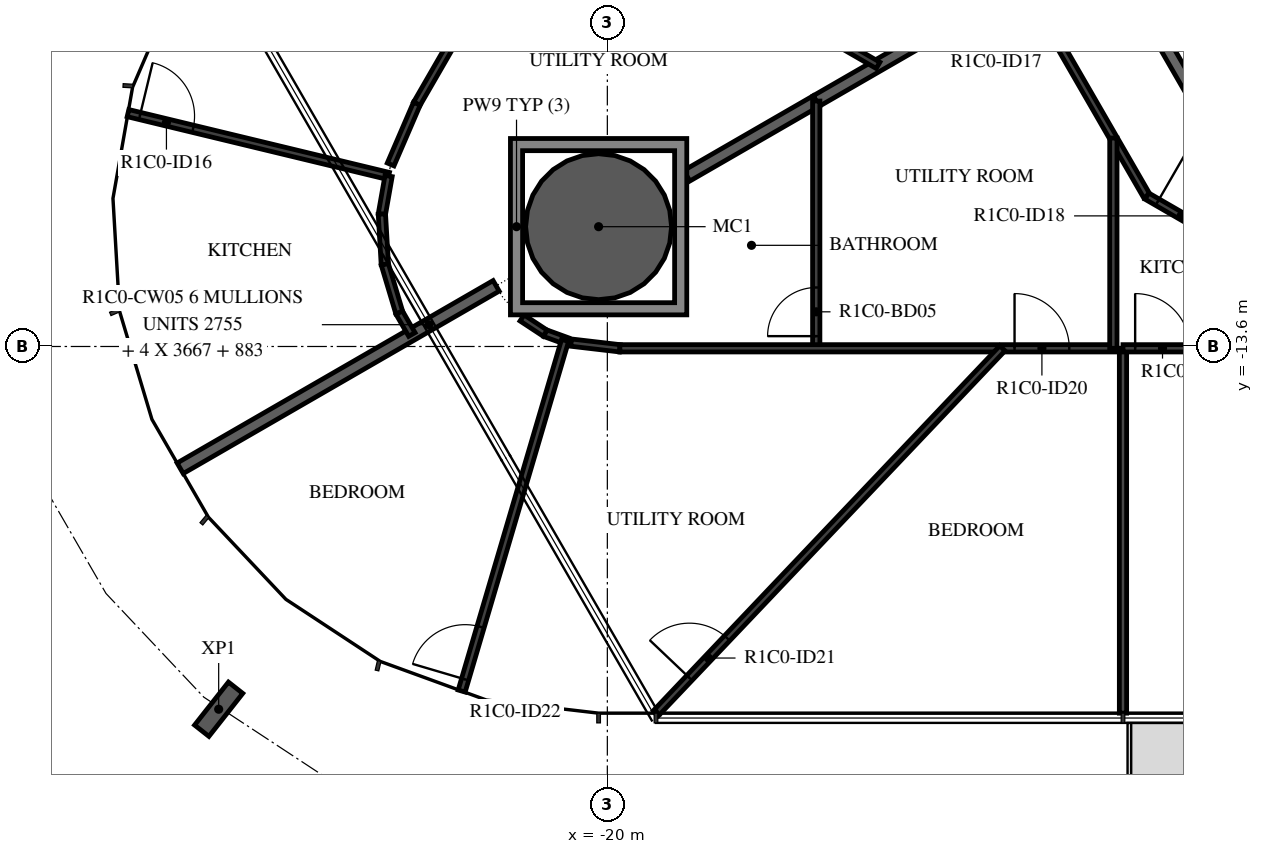
"""IFC4 building model, lengths in metres.
Left out: names, types, materials, properties, quantities, classifications, styles, units other than length and angle.
Written with IfcOpenShell. Run it as: python <this file> out.ifc"""

import sys

from ifc_helpers import new_model, si_unit, direction, frame, frame_2d, origin, origin_2d, place, context, subcontext, project, spatial, polyline, rectangle, hollow_circle, i_section, outline, extrude, element, fill, save


model = new_model("IFC4")
c1 = context("Model", 3, precision=1e-05, world=origin(), true_north=direction((0.0, 1.0)))
c2 = subcontext(c1, "Body", "Model", "MODEL_VIEW")
j1 = project(units=[si_unit("LENGTHUNIT", "METRE"), si_unit("PLANEANGLEUNIT", "RADIAN")], contexts=[c1])
p1 = place(None, origin())
s1 = spatial("IfcSite", under=j1, at=p1, CompositionType="ELEMENT")
p2 = place(p1, origin())
s2 = spatial("IfcBuilding", under=s1, at=p2, CompositionType="ELEMENT")
p3 = place(p2, frame((0.0, 0.0, 59.4)))
s3 = spatial("IfcBuildingStorey", under=s2, at=p3, CompositionType="ELEMENT", Elevation=59.4)
p4 = place(p3, frame((-20.144, -11.63, -0.38), z_axis=(0.0, 0.0, 1.0), x_axis=(1.0, 0.0, 0.0)))
e1 = element("IfcColumn", 1, at=p4, inside=s3, PredefinedType="COLUMN", context=c2, shape_type="SweptSolid", body=[
    extrude(hollow_circle(Radius=1.2, WallThickness=0.06, at=origin_2d()), origin(), (0.0, 0.0, 1.0), 3.5),
])
p5 = place(p3, frame((-26.392, -19.565, -0.38), z_axis=(0.0, 0.0, 1.0), x_axis=(-0.7856835335, 0.618628632693, 0.0)))
e2 = element("IfcColumn", 2, at=p5, inside=s3, PredefinedType="COLUMN", context=c2, shape_type="SweptSolid", body=[
    extrude(i_section(OverallWidth=0.3, OverallDepth=0.9, WebThickness=0.019, FlangeThickness=0.035, FilletRadius=0.03, at=origin_2d()), origin(), (0.0, 0.0, 1.0), 3.5),
])
p6 = place(p3, frame((-13.7, -3.671, 0.0), z_axis=(0.0, 0.0, 1.0), x_axis=(0.500001669485, -0.866024439905, 0.0)))
e3 = element("IfcWall", 3, at=p6, inside=s3, PredefinedType="STANDARD", context=c2, shape_type="SweptSolid", body=[
    extrude(rectangle(XDim=7.342, YDim=0.2, at=frame_2d((3.671, 0.0))), origin(), (0.0, 0.0, 1.0), 3.12),
])
p7 = place(p3, frame((-16.565, -9.564, 0.0), z_axis=(0.0, 0.0, 1.0), x_axis=(0.866028274568, 0.499995027624, 0.0)))
e4 = element("IfcWall", 4, at=p7, inside=s3, PredefinedType="STANDARD", context=c2, shape_type="SweptSolid", body=[
    extrude(rectangle(XDim=5.427, YDim=0.2, at=frame_2d((2.714, 0.0))), origin(), (0.0, 0.0, 1.0), 3.12),
])
p8 = place(p3, frame((-27.025, -15.603, 0.0), z_axis=(0.0, 0.0, 1.0), x_axis=(0.866020924479, 0.500007758305, 0.0)))
e5 = element("IfcWall", 5, at=p8, inside=s3, PredefinedType="STANDARD", context=c2, shape_type="SweptSolid", body=[
    extrude(rectangle(XDim=6.0, YDim=0.2, at=frame_2d((3.0, 0.0))), origin(), (0.0, 0.0, 1.0), 3.12),
])
p9 = place(p3, frame((-18.694, -10.793, 0.0), z_axis=(0.0, 0.0, 1.0), x_axis=(0.866046662726, 0.499963176624, 0.0)))
e6 = element("IfcWall", 6, at=p9, inside=s3, PredefinedType="STANDARD", context=c2, shape_type="SweptSolid", body=[
    extrude(rectangle(XDim=2.458, YDim=0.2, at=frame_2d((1.229, 0.0))), origin(), (0.0, 0.0, 1.0), 3.12),
])
p10 = place(p3, frame((-17.13, 0.79, 0.0), z_axis=(0.0, 0.0, 1.0), x_axis=(-0.499997052475, -0.866027105532, 0.0)))
e7 = element("IfcWall", 7, at=p10, inside=s3, PredefinedType="PARTITIONING", context=c2, shape_type="SweptSolid", body=[
    extrude(rectangle(XDim=12.006, YDim=0.12, at=frame_2d((6.003, 0.0))), origin(), (0.0, 0.0, 1.0), 3.12),
])
p11 = place(p10, frame((1.498, 0.0, 0.0)))
e8 = element("IfcOpeningElement", 8, at=p11, cuts=e7, PredefinedType="OPENING", context=c2, shape_type="SweptSolid", body=[
    extrude(rectangle(XDim=0.9, YDim=2.1, at=frame_2d((0.45, 1.05))), frame((0.0, 0.07, 0.0), z_axis=(0.0, -1.0, 0.0), x_axis=(1.0, 0.0, 0.0)), (0.0, 0.0, 1.0), 0.14),
])
p12 = place(p3, frame((-20.963, -5.85, 0.0), z_axis=(0.0, 0.0, 1.0), x_axis=(0.866021746608, -0.500006334362, 0.0)))
e9 = element("IfcWall", 9, at=p12, inside=s3, PredefinedType="PARTITIONING", context=c2, shape_type="SweptSolid", body=[
    extrude(rectangle(XDim=6.253, YDim=0.12, at=frame_2d((3.127, 0.0))), origin(), (0.0, 0.0, 1.0), 3.12),
])
p13 = place(p12, frame((0.2, 0.0, 0.0)))
e10 = element("IfcOpeningElement", 10, at=p13, cuts=e9, PredefinedType="OPENING", context=c2, shape_type="SweptSolid", body=[
    extrude(rectangle(XDim=0.9, YDim=2.1, at=frame_2d((0.45, 1.05))), frame((0.0, 0.07, 0.0), z_axis=(0.0, -1.0, 0.0), x_axis=(1.0, 0.0, 0.0)), (0.0, 0.0, 1.0), 0.14),
])
p14 = place(p3, frame((-23.564, -10.606, 0.0), z_axis=(0.0, 0.0, 1.0), x_axis=(0.396195073027, 0.918166359713, 0.0)))
e11 = element("IfcWall", 11, at=p14, inside=s3, PredefinedType="PARTITIONING", context=c2, shape_type="SweptSolid", body=[
    extrude(rectangle(XDim=1.087, YDim=0.12, at=frame_2d((0.543, 0.0))), origin(), (0.0, 0.0, 1.0), 3.12),
])
p15 = place(p3, frame((-27.883, -9.762, 0.0), z_axis=(0.0, 0.0, 1.0), x_axis=(0.972097015458, -0.234579181809, 0.0)))
e12 = element("IfcWall", 12, at=p15, inside=s3, PredefinedType="PARTITIONING", context=c2, shape_type="SweptSolid", body=[
    extrude(rectangle(XDim=4.409, YDim=0.12, at=frame_2d((2.204, 0.0))), origin(), (0.0, 0.0, 1.0), 3.12),
])
p16 = place(p15, frame((0.2, 0.0, 0.0)))
e13 = element("IfcOpeningElement", 13, at=p16, cuts=e12, PredefinedType="OPENING", context=c2, shape_type="SweptSolid", body=[
    extrude(rectangle(XDim=0.9, YDim=2.1, at=frame_2d((0.45, 1.05))), frame((0.0, 0.07, 0.0), z_axis=(0.0, -1.0, 0.0), x_axis=(1.0, 0.0, 0.0)), (0.0, 0.0, 1.0), 0.14),
])
p17 = place(p3, frame((-23.597, -10.796, 0.0), z_axis=(0.0, 0.0, 1.0), x_axis=(-0.173610040386, -0.984814476882, 0.0)))
e14 = element("IfcWall", 14, at=p17, inside=s3, PredefinedType="PARTITIONING", context=c2, shape_type="SweptSolid", body=[
    extrude(rectangle(XDim=0.636, YDim=0.12, at=frame_2d((0.318, 0.0))), origin(), (0.0, 0.0, 1.0), 3.12),
])
p18 = place(p3, frame((-23.708, -11.422, 0.0), z_axis=(0.0, 0.0, 1.0), x_axis=(0.058031280246, -0.998314765248, 0.0)))
e15 = element("IfcWall", 15, at=p18, inside=s3, PredefinedType="PARTITIONING", context=c2, shape_type="SweptSolid", body=[
    extrude(rectangle(XDim=0.829, YDim=0.12, at=frame_2d((0.415, 0.0))), origin(), (0.0, 0.0, 1.0), 3.12),
])
p19 = place(p3, frame((-23.659, -12.25, 0.0), z_axis=(0.0, 0.0, 1.0), x_axis=(0.286834510868, -0.957980147694, 0.0)))
e16 = element("IfcWall", 16, at=p19, inside=s3, PredefinedType="PARTITIONING", context=c2, shape_type="SweptSolid", body=[
    extrude(rectangle(XDim=0.829, YDim=0.12, at=frame_2d((0.415, 0.0))), origin(), (0.0, 0.0, 1.0), 3.12),
])
p20 = place(p3, frame((-23.422, -13.044, 0.0), z_axis=(0.0, 0.0, 1.0), x_axis=(0.50013037474, -0.865950118807, 0.0)))
e17 = element("IfcWall", 17, at=p20, inside=s3, PredefinedType="PARTITIONING", context=c2, shape_type="SweptSolid", body=[
    extrude(rectangle(XDim=0.415, YDim=0.12, at=frame_2d((0.207, 0.0))), origin(), (0.0, 0.0, 1.0), 3.12),
])
p21 = place(p3, frame((-13.164, -7.6, 0.0), z_axis=(0.0, 0.0, 1.0), x_axis=(0.500000928893, -0.866024867487, 0.0)))
e18 = element("IfcWall", 18, at=p21, inside=s3, PredefinedType="PARTITIONING", context=c2, shape_type="SweptSolid", body=[
    extrude(rectangle(XDim=4.073, YDim=0.12, at=frame_2d((2.036, 0.0))), origin(), (0.0, 0.0, 1.0), 3.12),
])
p22 = place(p21, frame((0.2, 0.0, 0.0)))
e19 = element("IfcOpeningElement", 19, at=p22, cuts=e18, PredefinedType="OPENING", context=c2, shape_type="SweptSolid", body=[
    extrude(rectangle(XDim=0.9, YDim=2.1, at=frame_2d((0.45, 1.05))), frame((0.0, 0.07, 0.0), z_axis=(0.0, -1.0, 0.0), x_axis=(1.0, 0.0, 0.0)), (0.0, 0.0, 1.0), 0.14),
])
p23 = place(p3, frame((-11.127, -11.127, 0.0), z_axis=(0.0, 0.0, 1.0), x_axis=(0.866034514313, -0.499984219769, 0.0)))
e20 = element("IfcWall", 20, at=p23, inside=s3, PredefinedType="PARTITIONING", context=c2, shape_type="SweptSolid", body=[
    extrude(rectangle(XDim=5.006, YDim=0.12, at=frame_2d((2.503, 0.0))), origin(), (0.0, 0.0, 1.0), 3.12),
])
p24 = place(p23, frame((0.2, 0.0, 0.0)))
e21 = element("IfcOpeningElement", 21, at=p24, cuts=e20, PredefinedType="OPENING", context=c2, shape_type="SweptSolid", body=[
    extrude(rectangle(XDim=0.9, YDim=2.1, at=frame_2d((0.45, 1.05))), frame((0.0, 0.07, 0.0), z_axis=(0.0, -1.0, 0.0), x_axis=(1.0, 0.0, 0.0)), (0.0, 0.0, 1.0), 0.14),
])
p25 = place(p3, frame((-20.657, -13.514, 0.0), z_axis=(0.0, 0.0, 1.0), x_axis=(-0.939665068469, 0.34209583321, 0.0)))
e22 = element("IfcWall", 22, at=p25, inside=s3, PredefinedType="PARTITIONING", context=c2, shape_type="SweptSolid", body=[
    extrude(rectangle(XDim=0.389, YDim=0.12, at=frame_2d((0.194, 0.0))), origin(), (0.0, 0.0, 1.0), 3.12),
])
p26 = place(p3, frame((-21.023, -13.381, 0.0), z_axis=(0.0, 0.0, 1.0), x_axis=(-0.835339231854, 0.549734815821, 0.0)))
e23 = element("IfcWall", 23, at=p26, inside=s3, PredefinedType="PARTITIONING", context=c2, shape_type="SweptSolid", body=[
    extrude(rectangle(XDim=0.455, YDim=0.12, at=frame_2d((0.228, 0.0))), origin(), (0.0, 0.0, 1.0), 3.12),
])
p27 = place(p3, frame((-22.396, -19.266, 0.0), z_axis=(0.0, 0.0, 1.0), x_axis=(0.282896205585, 0.959150528783, 0.0)))
e24 = element("IfcWall", 24, at=p27, inside=s3, PredefinedType="PARTITIONING", context=c2, shape_type="SweptSolid", body=[
    extrude(rectangle(XDim=6.012, YDim=0.12, at=frame_2d((3.006, 0.0))), origin(), (0.0, 0.0, 1.0), 3.12),
])
p28 = place(p27, frame((0.2, 0.0, 0.0)))
e25 = element("IfcOpeningElement", 25, at=p28, cuts=e24, PredefinedType="OPENING", context=c2, shape_type="SweptSolid", body=[
    extrude(rectangle(XDim=0.9, YDim=2.1, at=frame_2d((0.45, 1.05))), frame((0.0, 0.07, 0.0), z_axis=(0.0, -1.0, 0.0), x_axis=(1.0, 0.0, 0.0)), (0.0, 0.0, 1.0), 0.14),
])
p29 = place(p3, frame((-16.565, -13.63, 0.0), z_axis=(0.0, 0.0, 1.0), x_axis=(0.0, 1.0, 0.0)))
e26 = element("IfcWall", 26, at=p29, inside=s3, PredefinedType="PARTITIONING", context=c2, shape_type="SweptSolid", body=[
    extrude(rectangle(XDim=4.066, YDim=0.12, at=frame_2d((2.033, 0.0))), origin(), (0.0, 0.0, 1.0), 3.12),
])
p30 = place(p29, frame((0.2, 0.0, 0.0)))
e27 = element("IfcOpeningElement", 27, at=p30, cuts=e26, PredefinedType="OPENING", context=c2, shape_type="SweptSolid", body=[
    extrude(rectangle(XDim=0.8, YDim=2.1, at=frame_2d((0.4, 1.05))), frame((0.0, 0.07, 0.0), z_axis=(0.0, -1.0, 0.0), x_axis=(1.0, 0.0, 0.0)), (0.0, 0.0, 1.0), 0.14),
])
p31 = place(p3, frame((-20.595, -13.536, 0.0), z_axis=(0.0, 0.0, 1.0), x_axis=(0.993259655268, -0.115910556968, 0.0)))
e28 = element("IfcWall", 28, at=p31, inside=s3, PredefinedType="PARTITIONING", context=c2, shape_type="SweptSolid", body=[
    extrude(rectangle(XDim=0.807, YDim=0.12, at=frame_2d((0.403, 0.0))), origin(), (0.0, 0.0, 1.0), 3.12),
])
p32 = place(p3, frame((-19.794, -13.63, 0.0), z_axis=(0.0, 0.0, 1.0), x_axis=(1.0, 0.0, 0.0)))
e29 = element("IfcWall", 29, at=p32, inside=s3, PredefinedType="PARTITIONING", context=c2, shape_type="SweptSolid", body=[
    extrude(rectangle(XDim=8.156, YDim=0.12, at=frame_2d((4.078, 0.0))), origin(), (0.0, 0.0, 1.0), 3.12),
])
p33 = place(p32, frame((6.491, 0.0, 0.0)))
e30 = element("IfcOpeningElement", 30, at=p33, cuts=e29, PredefinedType="OPENING", context=c2, shape_type="SweptSolid", body=[
    extrude(rectangle(XDim=0.9, YDim=2.1, at=frame_2d((0.45, 1.05))), frame((0.0, 0.07, 0.0), z_axis=(0.0, -1.0, 0.0), x_axis=(1.0, 0.0, 0.0)), (0.0, 0.0, 1.0), 0.14),
])
p34 = place(p3, frame((-11.678, -13.63, 0.0), z_axis=(0.0, 0.0, 1.0), x_axis=(0.0, 1.0, 0.0)))
e31 = element("IfcWall", 31, at=p34, inside=s3, PredefinedType="PARTITIONING", context=c2, shape_type="SweptSolid", body=[
    extrude(rectangle(XDim=3.458, YDim=0.12, at=frame_2d((1.729, 0.0))), origin(), (0.0, 0.0, 1.0), 3.12),
])
p35 = place(p3, frame((-19.2, -19.63, 0.0), z_axis=(0.0, 0.0, 1.0), x_axis=(0.688544699396, 0.72519390299, 0.0)))
e32 = element("IfcWall", 32, at=p35, inside=s3, PredefinedType="PARTITIONING", context=c2, shape_type="SweptSolid", body=[
    extrude(rectangle(XDim=8.274, YDim=0.12, at=frame_2d((4.137, 0.0))), origin(), (0.0, 0.0, 1.0), 3.12),
])
p36 = place(p35, frame((0.8, 0.0, 0.0)))
e33 = element("IfcOpeningElement", 33, at=p36, cuts=e32, PredefinedType="OPENING", context=c2, shape_type="SweptSolid", body=[
    extrude(rectangle(XDim=0.9, YDim=2.1, at=frame_2d((0.45, 1.05))), frame((0.0, 0.07, 0.0), z_axis=(0.0, -1.0, 0.0), x_axis=(1.0, 0.0, 0.0)), (0.0, 0.0, 1.0), 0.14),
])
p37 = place(p3, frame((-11.52, -19.63, 0.0), z_axis=(0.0, 0.0, 1.0), x_axis=(0.0, 1.0, 0.0)))
e34 = element("IfcWall", 34, at=p37, inside=s3, PredefinedType="PARTITIONING", context=c2, shape_type="SweptSolid", body=[
    extrude(rectangle(XDim=6.0, YDim=0.12, at=frame_2d((3.0, 0.0))), origin(), (0.0, 0.0, 1.0), 2.73),
])
p38 = place(p3, frame((-11.52, -13.63, 0.0), z_axis=(0.0, 0.0, 1.0), x_axis=(1.0, 0.0, 0.0)))
e35 = element("IfcWall", 35, at=p38, inside=s3, PredefinedType="PARTITIONING", context=c2, shape_type="SweptSolid", body=[
    extrude(rectangle(XDim=4.728, YDim=0.12, at=frame_2d((2.364, 0.0))), origin(), (0.0, 0.0, 1.0), 3.12),
])
p39 = place(p38, frame((0.2, 0.0, 0.0)))
e36 = element("IfcOpeningElement", 36, at=p39, cuts=e35, PredefinedType="OPENING", context=c2, shape_type="SweptSolid", body=[
    extrude(rectangle(XDim=0.9, YDim=2.1, at=frame_2d((0.45, 1.05))), frame((0.0, 0.07, 0.0), z_axis=(0.0, -1.0, 0.0), x_axis=(1.0, 0.0, 0.0)), (0.0, 0.0, 1.0), 0.14),
])
p40 = place(p3, origin())
e37 = element("IfcWall", 37, at=p40, inside=s3, PredefinedType="STANDARD", context=c2, shape_type="SweptSolid", body=[
    extrude(outline(polyline([(-18.694, -10.18), (-18.694, -13.08), (-21.594, -13.08), (-21.594, -10.18), (-18.694, -10.18)]), holes=[polyline([(-21.394, -12.88), (-18.894, -12.88), (-18.894, -10.38), (-21.394, -10.38), (-21.394, -12.88)])]), origin(), (0.0, 0.0, 1.0), 3.12),
])
p41 = place(p16, origin())
e38 = element("IfcDoor", 38, at=p41, inside=s3, OperationType="SINGLE_SWING_RIGHT", PredefinedType="DOOR", context=c2, shape_type="SweptSolid", body=[
    extrude(rectangle(XDim=0.9, YDim=2.1, at=frame_2d((0.45, 1.05))), frame((0.0, 0.025, 0.0), z_axis=(0.0, -1.0, 0.0), x_axis=(1.0, 0.0, 0.0)), (0.0, 0.0, 1.0), 0.05),
])
fill(e13, e38)
p42 = place(p24, origin())
e39 = element("IfcDoor", 39, at=p42, inside=s3, OperationType="SINGLE_SWING_LEFT", PredefinedType="DOOR", context=c2, shape_type="SweptSolid", body=[
    extrude(rectangle(XDim=0.9, YDim=2.1, at=frame_2d((0.45, 1.05))), frame((0.0, 0.025, 0.0), z_axis=(0.0, -1.0, 0.0), x_axis=(1.0, 0.0, 0.0)), (0.0, 0.0, 1.0), 0.05),
])
fill(e21, e39)
p43 = place(p30, origin())
e40 = element("IfcDoor", 40, at=p43, inside=s3, OperationType="SINGLE_SWING_LEFT", PredefinedType="DOOR", context=c2, shape_type="SweptSolid", body=[
    extrude(rectangle(XDim=0.8, YDim=2.1, at=frame_2d((0.4, 1.05))), frame((0.0, 0.025, 0.0), z_axis=(0.0, -1.0, 0.0), x_axis=(1.0, 0.0, 0.0)), (0.0, 0.0, 1.0), 0.05),
])
fill(e27, e40)
p44 = place(p33, origin())
e41 = element("IfcDoor", 41, at=p44, inside=s3, OperationType="SINGLE_SWING_LEFT", PredefinedType="DOOR", context=c2, shape_type="SweptSolid", body=[
    extrude(rectangle(XDim=0.9, YDim=2.1, at=frame_2d((0.45, 1.05))), frame((0.0, 0.025, 0.0), z_axis=(0.0, -1.0, 0.0), x_axis=(1.0, 0.0, 0.0)), (0.0, 0.0, 1.0), 0.05),
])
fill(e30, e41)
p45 = place(p36, origin())
e42 = element("IfcDoor", 42, at=p45, inside=s3, OperationType="SINGLE_SWING_LEFT", PredefinedType="DOOR", context=c2, shape_type="SweptSolid", body=[
    extrude(rectangle(XDim=0.9, YDim=2.1, at=frame_2d((0.45, 1.05))), frame((0.0, 0.025, 0.0), z_axis=(0.0, -1.0, 0.0), x_axis=(1.0, 0.0, 0.0)), (0.0, 0.0, 1.0), 0.05),
])
fill(e33, e42)
p46 = place(p28, origin())
e43 = element("IfcDoor", 43, at=p46, inside=s3, OperationType="SINGLE_SWING_LEFT", PredefinedType="DOOR", context=c2, shape_type="SweptSolid", body=[
    extrude(rectangle(XDim=0.9, YDim=2.1, at=frame_2d((0.45, 1.05))), frame((0.0, 0.025, 0.0), z_axis=(0.0, -1.0, 0.0), x_axis=(1.0, 0.0, 0.0)), (0.0, 0.0, 1.0), 0.05),
])
fill(e25, e43)
p47 = place(p39, origin())
e44 = element("IfcDoor", 44, at=p47, inside=s3, OperationType="SINGLE_SWING_RIGHT", PredefinedType="DOOR", context=c2, shape_type="SweptSolid", body=[
    extrude(rectangle(XDim=0.9, YDim=2.1, at=frame_2d((0.45, 1.05))), frame((0.0, 0.025, 0.0), z_axis=(0.0, -1.0, 0.0), x_axis=(1.0, 0.0, 0.0)), (0.0, 0.0, 1.0), 0.05),
])
fill(e36, e44)
save(model, sys.argv[1])
